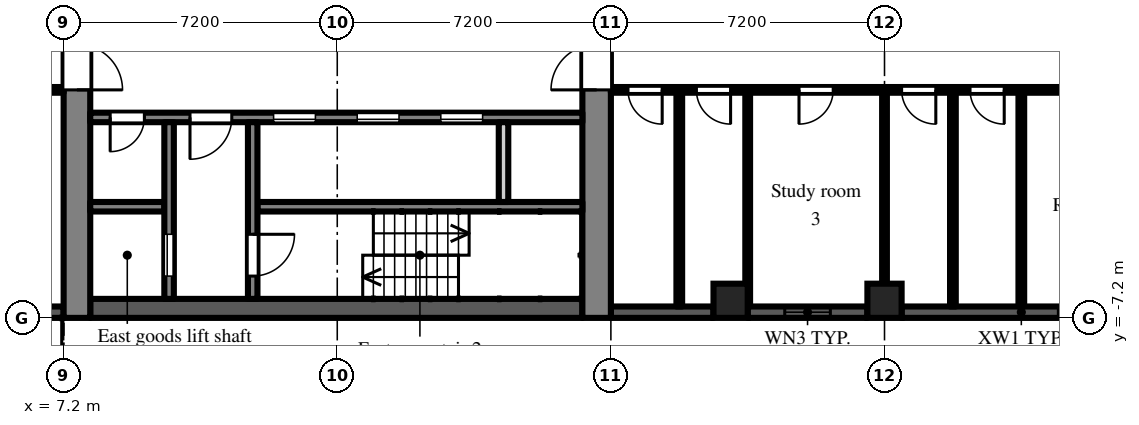
"""IFC4 building model, lengths in metres.
Left out: names, types, materials, properties, quantities, classifications, styles, units other than length and angle.
Written with IfcOpenShell. Run it as: python <this file> out.ifc"""

import sys

from ifc_helpers import new_model, si_unit, direction, frame, frame_2d, origin, origin_2d, place, context, subcontext, project, spatial, rectangle, extrude, element, fill, save


model = new_model("IFC4")
c1 = context("Model", 3, precision=1e-05, world=origin(), true_north=direction((0.0, 1.0)))
c2 = subcontext(c1, "Body", "Model", "MODEL_VIEW")
j1 = project(units=[si_unit("LENGTHUNIT", "METRE"), si_unit("PLANEANGLEUNIT", "RADIAN")], contexts=[c1])
p1 = place(None, origin())
s1 = spatial("IfcSite", under=j1, at=p1, CompositionType="ELEMENT")
p2 = place(p1, origin())
s2 = spatial("IfcBuilding", under=s1, at=p2, CompositionType="ELEMENT")
p3 = place(p2, frame((0.0, 0.0, 75.9)))
s3 = spatial("IfcBuildingStorey", under=s2, at=p3, CompositionType="ELEMENT", Elevation=75.9)
for number, where, z_axis, x_axis in (
    (1, (24.75, -6.75, 0.0), (0.0, 0.0, 1.0), (1.0, 0.0, 0.0)),
    (2, (28.8, -6.75, 0.0), (0.0, 0.0, 1.0), (1.0, 0.0, 0.0)),
):
    element("IfcColumn", number, at=place(p3, frame(where, z_axis=z_axis, x_axis=x_axis)), inside=s3, PredefinedType="COLUMN", context=c2, shape_type="SweptSolid", body=[
        extrude(rectangle(XDim=0.9, YDim=0.9, at=origin_2d()), origin(), (0.0, 0.0, 1.0), 3.0),
    ])
p4 = place(p3, frame((21.6, -7.05, 0.0), z_axis=(0.0, 0.0, 1.0), x_axis=(1.0, 0.0, 0.0)))
e3 = element("IfcWall", 3, at=p4, inside=s3, PredefinedType="SOLIDWALL", context=c2, shape_type="SweptSolid", body=[
    extrude(rectangle(XDim=2.7, YDim=0.3, at=frame_2d((1.35, 0.0))), origin(), (0.0, 0.0, 1.0), 2.1),
])
p5 = place(p3, frame((25.2, -7.05, 0.0), z_axis=(0.0, 0.0, 1.0), x_axis=(1.0, 0.0, 0.0)))
e4 = element("IfcWall", 4, at=p5, inside=s3, PredefinedType="SOLIDWALL", context=c2, shape_type="SweptSolid", body=[
    extrude(rectangle(XDim=3.15, YDim=0.3, at=frame_2d((1.575, 0.0))), origin(), (0.0, 0.0, 1.0), 2.1),
])
p6 = place(p5, frame((0.975, 0.0, 0.2)))
e5 = element("IfcOpeningElement", 5, at=p6, cuts=e4, PredefinedType="OPENING", context=c2, shape_type="SweptSolid", body=[
    extrude(rectangle(XDim=1.2, YDim=1.85, at=frame_2d((0.6, 0.925))), frame((0.0, 0.16, 0.0), z_axis=(0.0, -1.0, 0.0), x_axis=(1.0, 0.0, 0.0)), (0.0, 0.0, 1.0), 0.32),
])
p7 = place(p3, frame((29.25, -7.05, 0.0), z_axis=(0.0, 0.0, 1.0), x_axis=(1.0, 0.0, 0.0)))
e6 = element("IfcWall", 6, at=p7, inside=s3, PredefinedType="SOLIDWALL", context=c2, shape_type="SweptSolid", body=[
    extrude(rectangle(XDim=6.3, YDim=0.3, at=frame_2d((3.15, 0.0))), origin(), (0.0, 0.0, 1.0), 2.1),
])
p8 = place(p7, frame((4.125, 0.0, 0.2)))
e7 = element("IfcOpeningElement", 7, at=p8, cuts=e6, PredefinedType="OPENING", context=c2, shape_type="SweptSolid", body=[
    extrude(rectangle(XDim=1.2, YDim=1.85, at=frame_2d((0.6, 0.925))), frame((0.0, 0.16, 0.0), z_axis=(0.0, -1.0, 0.0), x_axis=(1.0, 0.0, 0.0)), (0.0, 0.0, 1.0), 0.32),
])
p9 = place(p3, frame((4.2, -7.05, 0.0), z_axis=(0.0, 0.0, 1.0), x_axis=(1.0, 0.0, 0.0)))
e8 = element("IfcWall", 8, at=p9, inside=s3, PredefinedType="SOLIDWALL", context=c2, shape_type="SweptSolid", body=[
    extrude(rectangle(XDim=3.0, YDim=0.3, at=frame_2d((1.5, 0.0))), origin(), (0.0, 0.0, 1.0), 2.1),
])
p10 = place(p3, frame((7.55, -7.2, 0.0), z_axis=(0.0, 0.0, 1.0), x_axis=(0.0, 1.0, 0.0)))
e9 = element("IfcWall", 9, at=p10, inside=s3, PredefinedType="SHEAR", context=c2, shape_type="SweptSolid", body=[
    extrude(rectangle(XDim=14.4, YDim=0.7, at=frame_2d((7.2, 0.0))), origin(), (0.0, 0.0, 1.0), 2.575),
])
p11 = place(p10, frame((6.0, 0.0, 0.0)))
e10 = element("IfcOpeningElement", 10, at=p11, cuts=e9, PredefinedType="OPENING", context=c2, shape_type="SweptSolid", body=[
    extrude(rectangle(XDim=2.4, YDim=2.2, at=frame_2d((1.2, 1.1))), frame((0.0, 0.36, 0.0), z_axis=(0.0, -1.0, 0.0), x_axis=(1.0, 0.0, 0.0)), (0.0, 0.0, 1.0), 0.72),
])
p12 = place(p3, frame((21.225, -7.2, 0.0), z_axis=(0.0, 0.0, 1.0), x_axis=(0.0, 1.0, 0.0)))
e11 = element("IfcWall", 11, at=p12, inside=s3, PredefinedType="SHEAR", context=c2, shape_type="SweptSolid", body=[
    extrude(rectangle(XDim=14.4, YDim=0.75, at=frame_2d((7.2, 0.0))), origin(), (0.0, 0.0, 1.0), 2.575),
])
p13 = place(p12, frame((6.0, 0.0, 0.0)))
e12 = element("IfcOpeningElement", 12, at=p13, cuts=e11, PredefinedType="OPENING", context=c2, shape_type="SweptSolid", body=[
    extrude(rectangle(XDim=2.4, YDim=2.2, at=frame_2d((1.2, 1.1))), frame((0.0, 0.385, 0.0), z_axis=(0.0, -1.0, 0.0), x_axis=(1.0, 0.0, 0.0)), (0.0, 0.0, 1.0), 0.77),
])
p14 = place(p3, frame((7.9, -6.95, 0.0), z_axis=(0.0, 0.0, 1.0), x_axis=(1.0, 0.0, 0.0)))
e13 = element("IfcWall", 13, at=p14, inside=s3, PredefinedType="SHEAR", context=c2, shape_type="SweptSolid", body=[
    extrude(rectangle(XDim=12.95, YDim=0.5, at=frame_2d((6.475, 0.0))), origin(), (0.0, 0.0, 1.0), 2.575),
])
p15 = place(p3, frame((7.9, -1.925, 0.0), z_axis=(0.0, 0.0, 1.0), x_axis=(1.0, 0.0, 0.0)))
e14 = element("IfcWall", 14, at=p15, inside=s3, PredefinedType="SHEAR", context=c2, shape_type="SweptSolid", body=[
    extrude(rectangle(XDim=12.95, YDim=0.25, at=frame_2d((6.475, 0.0))), origin(), (0.0, 0.0, 1.0), 2.575),
])
p16 = place(p15, frame((4.825, 0.0, 0.0)))
e15 = element("IfcOpeningElement", 15, at=p16, cuts=e14, PredefinedType="OPENING", context=c2, shape_type="SweptSolid", body=[
    extrude(rectangle(XDim=1.1, YDim=2.1, at=frame_2d((0.55, 1.05))), frame((0.0, 0.135, 0.0), z_axis=(0.0, -1.0, 0.0), x_axis=(1.0, 0.0, 0.0)), (0.0, 0.0, 1.0), 0.27),
])
p17 = place(p15, frame((7.025, 0.0, 0.0)))
e16 = element("IfcOpeningElement", 16, at=p17, cuts=e14, PredefinedType="OPENING", context=c2, shape_type="SweptSolid", body=[
    extrude(rectangle(XDim=1.1, YDim=2.1, at=frame_2d((0.55, 1.05))), frame((0.0, 0.135, 0.0), z_axis=(0.0, -1.0, 0.0), x_axis=(1.0, 0.0, 0.0)), (0.0, 0.0, 1.0), 0.27),
])
p18 = place(p15, frame((9.225, 0.0, 0.0)))
e17 = element("IfcOpeningElement", 17, at=p18, cuts=e14, PredefinedType="OPENING", context=c2, shape_type="SweptSolid", body=[
    extrude(rectangle(XDim=1.1, YDim=2.1, at=frame_2d((0.55, 1.05))), frame((0.0, 0.135, 0.0), z_axis=(0.0, -1.0, 0.0), x_axis=(1.0, 0.0, 0.0)), (0.0, 0.0, 1.0), 0.27),
])
p19 = place(p15, frame((0.525, 0.0, 0.0)))
e18 = element("IfcOpeningElement", 18, at=p19, cuts=e14, PredefinedType="OPENING", context=c2, shape_type="SweptSolid", body=[
    extrude(rectangle(XDim=0.9, YDim=2.1, at=frame_2d((0.45, 1.05))), frame((0.0, 0.135, 0.0), z_axis=(0.0, -1.0, 0.0), x_axis=(1.0, 0.0, 0.0)), (0.0, 0.0, 1.0), 0.27),
])
p20 = place(p15, frame((2.625, 0.0, 0.0)))
e19 = element("IfcOpeningElement", 19, at=p20, cuts=e14, PredefinedType="OPENING", context=c2, shape_type="SweptSolid", body=[
    extrude(rectangle(XDim=1.1, YDim=2.1, at=frame_2d((0.55, 1.05))), frame((0.0, 0.135, 0.0), z_axis=(0.0, -1.0, 0.0), x_axis=(1.0, 0.0, 0.0)), (0.0, 0.0, 1.0), 0.27),
])
p21 = place(p3, frame((7.9, -4.275, 0.0), z_axis=(0.0, 0.0, 1.0), x_axis=(1.0, 0.0, 0.0)))
e20 = element("IfcWall", 20, at=p21, inside=s3, PredefinedType="SHEAR", context=c2, shape_type="SweptSolid", body=[
    extrude(rectangle(XDim=1.95, YDim=0.25, at=frame_2d((0.975, 0.0))), origin(), (0.0, 0.0, 1.0), 2.575),
])
p22 = place(p3, frame((12.3, -4.275, 0.0), z_axis=(0.0, 0.0, 1.0), x_axis=(1.0, 0.0, 0.0)))
e21 = element("IfcWall", 21, at=p22, inside=s3, PredefinedType="SHEAR", context=c2, shape_type="SweptSolid", body=[
    extrude(rectangle(XDim=8.55, YDim=0.25, at=frame_2d((4.275, 0.0))), origin(), (0.0, 0.0, 1.0), 2.575),
])
p23 = place(p3, frame((9.975, -2.05, 0.0), z_axis=(0.0, 0.0, 1.0), x_axis=(0.0, -1.0, 0.0)))
e22 = element("IfcWall", 22, at=p23, inside=s3, PredefinedType="SHEAR", context=c2, shape_type="SweptSolid", body=[
    extrude(rectangle(XDim=4.65, YDim=0.25, at=frame_2d((2.325, 0.0))), origin(), (0.0, 0.0, 1.0), 2.575),
])
p24 = place(p23, frame((2.95, 0.0, 0.0)))
e23 = element("IfcOpeningElement", 23, at=p24, cuts=e22, PredefinedType="OPENING", context=c2, shape_type="SweptSolid", body=[
    extrude(rectangle(XDim=1.1, YDim=2.1, at=frame_2d((0.55, 1.05))), frame((0.0, 0.135, 0.0), z_axis=(0.0, -1.0, 0.0), x_axis=(1.0, 0.0, 0.0)), (0.0, 0.0, 1.0), 0.27),
])
p25 = place(p3, frame((12.175, -2.05, 0.0), z_axis=(0.0, 0.0, 1.0), x_axis=(0.0, -1.0, 0.0)))
e24 = element("IfcWall", 24, at=p25, inside=s3, PredefinedType="SHEAR", context=c2, shape_type="SweptSolid", body=[
    extrude(rectangle(XDim=4.65, YDim=0.25, at=frame_2d((2.325, 0.0))), origin(), (0.0, 0.0, 1.0), 2.575),
])
p26 = place(p25, frame((2.95, 0.0, 0.0)))
e25 = element("IfcOpeningElement", 25, at=p26, cuts=e24, PredefinedType="OPENING", context=c2, shape_type="SweptSolid", body=[
    extrude(rectangle(XDim=1.1, YDim=2.1, at=frame_2d((0.55, 1.05))), frame((0.0, 0.135, 0.0), z_axis=(0.0, -1.0, 0.0), x_axis=(1.0, 0.0, 0.0)), (0.0, 0.0, 1.0), 0.27),
])
p27 = place(p3, frame((18.775, -2.05, 0.0), z_axis=(0.0, 0.0, 1.0), x_axis=(0.0, -1.0, 0.0)))
e26 = element("IfcWall", 26, at=p27, inside=s3, PredefinedType="PARTITIONING", context=c2, shape_type="SweptSolid", body=[
    extrude(rectangle(XDim=2.1, YDim=0.25, at=frame_2d((1.05, 0.0))), origin(), (0.0, 0.0, 1.0), 2.575),
])
p28 = place(p3, frame((1.275, -1.2, 0.0), z_axis=(0.0, 0.0, 1.0), x_axis=(1.0, 0.0, 0.0)))
e27 = element("IfcWall", 27, at=p28, inside=s3, PredefinedType="PARTITIONING", context=c2, shape_type="SweptSolid", body=[
    extrude(rectangle(XDim=5.925, YDim=0.15, at=frame_2d((2.962, 0.0))), origin(), (0.0, 0.0, 1.0), 2.575),
])
p29 = place(p28, frame((3.075, 0.0, 0.0)))
e28 = element("IfcOpeningElement", 28, at=p29, cuts=e27, PredefinedType="OPENING", context=c2, shape_type="SweptSolid", body=[
    extrude(rectangle(XDim=0.9, YDim=2.1, at=frame_2d((0.45, 1.05))), frame((0.0, 0.085, 0.0), z_axis=(0.0, -1.0, 0.0), x_axis=(1.0, 0.0, 0.0)), (0.0, 0.0, 1.0), 0.17),
])
p30 = place(p3, frame((21.6, -1.2, 0.0), z_axis=(0.0, 0.0, 1.0), x_axis=(1.0, 0.0, 0.0)))
e29 = element("IfcWall", 29, at=p30, inside=s3, PredefinedType="PARTITIONING", context=c2, shape_type="SweptSolid", body=[
    extrude(rectangle(XDim=14.9, YDim=0.15, at=frame_2d((7.45, 0.0))), origin(), (0.0, 0.0, 1.0), 2.575),
])
p31 = place(p30, frame((0.45, 0.0, 0.0)))
e30 = element("IfcOpeningElement", 30, at=p31, cuts=e29, PredefinedType="OPENING", context=c2, shape_type="SweptSolid", body=[
    extrude(rectangle(XDim=0.9, YDim=2.1, at=frame_2d((0.45, 1.05))), frame((0.0, 0.085, 0.0), z_axis=(0.0, -1.0, 0.0), x_axis=(1.0, 0.0, 0.0)), (0.0, 0.0, 1.0), 0.17),
])
p32 = place(p30, frame((2.25, 0.0, 0.0)))
e31 = element("IfcOpeningElement", 31, at=p32, cuts=e29, PredefinedType="OPENING", context=c2, shape_type="SweptSolid", body=[
    extrude(rectangle(XDim=0.9, YDim=2.1, at=frame_2d((0.45, 1.05))), frame((0.0, 0.085, 0.0), z_axis=(0.0, -1.0, 0.0), x_axis=(1.0, 0.0, 0.0)), (0.0, 0.0, 1.0), 0.17),
])
p33 = place(p30, frame((4.95, 0.0, 0.0)))
e32 = element("IfcOpeningElement", 32, at=p33, cuts=e29, PredefinedType="OPENING", context=c2, shape_type="SweptSolid", body=[
    extrude(rectangle(XDim=0.9, YDim=2.1, at=frame_2d((0.45, 1.05))), frame((0.0, 0.085, 0.0), z_axis=(0.0, -1.0, 0.0), x_axis=(1.0, 0.0, 0.0)), (0.0, 0.0, 1.0), 0.17),
])
p34 = place(p30, frame((7.65, 0.0, 0.0)))
e33 = element("IfcOpeningElement", 33, at=p34, cuts=e29, PredefinedType="OPENING", context=c2, shape_type="SweptSolid", body=[
    extrude(rectangle(XDim=0.9, YDim=2.1, at=frame_2d((0.45, 1.05))), frame((0.0, 0.085, 0.0), z_axis=(0.0, -1.0, 0.0), x_axis=(1.0, 0.0, 0.0)), (0.0, 0.0, 1.0), 0.17),
])
p35 = place(p30, frame((9.45, 0.0, 0.0)))
e34 = element("IfcOpeningElement", 34, at=p35, cuts=e29, PredefinedType="OPENING", context=c2, shape_type="SweptSolid", body=[
    extrude(rectangle(XDim=0.9, YDim=2.1, at=frame_2d((0.45, 1.05))), frame((0.0, 0.085, 0.0), z_axis=(0.0, -1.0, 0.0), x_axis=(1.0, 0.0, 0.0)), (0.0, 0.0, 1.0), 0.17),
])
p36 = place(p30, frame((11.95, 0.0, 0.0)))
e35 = element("IfcOpeningElement", 35, at=p36, cuts=e29, PredefinedType="OPENING", context=c2, shape_type="SweptSolid", body=[
    extrude(rectangle(XDim=1.8, YDim=2.1, at=frame_2d((0.9, 1.05))), frame((0.0, 0.085, 0.0), z_axis=(0.0, -1.0, 0.0), x_axis=(1.0, 0.0, 0.0)), (0.0, 0.0, 1.0), 0.17),
])
p37 = place(p3, frame((23.4, -6.9, 0.0), z_axis=(0.0, 0.0, 1.0), x_axis=(0.0, 1.0, 0.0)))
e36 = element("IfcWall", 36, at=p37, inside=s3, PredefinedType="PARTITIONING", context=c2, shape_type="SweptSolid", body=[
    extrude(rectangle(XDim=5.625, YDim=0.15, at=frame_2d((2.812, 0.0))), origin(), (0.0, 0.0, 1.0), 2.575),
])
for number, where, z_axis, x_axis in (
    (37, (25.2, -6.9, 0.0), (0.0, 0.0, 1.0), (0.0, 1.0, 0.0)),
    (38, (28.8, -6.9, 0.0), (0.0, 0.0, 1.0), (0.0, 1.0, 0.0)),
):
    element("IfcWall", number, at=place(p3, frame(where, z_axis=z_axis, x_axis=x_axis)), inside=s3, PredefinedType="PARTITIONING", context=c2, shape_type="SweptSolid", body=[
        extrude(rectangle(XDim=5.625, YDim=0.125, at=frame_2d((2.812, 0.0))), origin(), (0.0, 0.0, 1.0), 2.575),
    ])
for number, where, z_axis, x_axis in (
    (39, (30.6, -6.9, 0.0), (0.0, 0.0, 1.0), (0.0, 1.0, 0.0)),
    (40, (32.4, -6.9, 0.0), (0.0, 0.0, 1.0), (0.0, 1.0, 0.0)),
):
    element("IfcWall", number, at=place(p3, frame(where, z_axis=z_axis, x_axis=x_axis)), inside=s3, PredefinedType="PARTITIONING", context=c2, shape_type="SweptSolid", body=[
        extrude(rectangle(XDim=5.625, YDim=0.15, at=frame_2d((2.812, 0.0))), origin(), (0.0, 0.0, 1.0), 2.575),
    ])
p38 = place(p6, origin())
e41 = element("IfcWindow", 41, at=p38, inside=s3, PartitioningType="SINGLE_PANEL", PredefinedType="WINDOW", context=c2, shape_type="SweptSolid", body=[
    extrude(rectangle(XDim=1.2, YDim=1.85, at=frame_2d((0.6, 0.925))), frame((0.0, 0.03, 0.0), z_axis=(0.0, -1.0, 0.0), x_axis=(1.0, 0.0, 0.0)), (0.0, 0.0, 1.0), 0.06),
])
fill(e5, e41)
p39 = place(p8, origin())
e42 = element("IfcWindow", 42, at=p39, inside=s3, PartitioningType="SINGLE_PANEL", PredefinedType="WINDOW", context=c2, shape_type="SweptSolid", body=[
    extrude(rectangle(XDim=1.2, YDim=1.85, at=frame_2d((0.6, 0.925))), frame((0.0, 0.03, 0.0), z_axis=(0.0, -1.0, 0.0), x_axis=(1.0, 0.0, 0.0)), (0.0, 0.0, 1.0), 0.06),
])
fill(e7, e42)
p40 = place(p16, origin())
e43 = element("IfcDoor", 43, at=p40, inside=s3, OperationType="SLIDING_TO_LEFT", PredefinedType="DOOR", context=c2, shape_type="SweptSolid", body=[
    extrude(rectangle(XDim=1.1, YDim=2.1, at=frame_2d((0.55, 1.05))), frame((0.0, 0.025, 0.0), z_axis=(0.0, -1.0, 0.0), x_axis=(1.0, 0.0, 0.0)), (0.0, 0.0, 1.0), 0.05),
])
fill(e15, e43)
p41 = place(p17, origin())
e44 = element("IfcDoor", 44, at=p41, inside=s3, OperationType="SLIDING_TO_LEFT", PredefinedType="DOOR", context=c2, shape_type="SweptSolid", body=[
    extrude(rectangle(XDim=1.1, YDim=2.1, at=frame_2d((0.55, 1.05))), frame((0.0, 0.025, 0.0), z_axis=(0.0, -1.0, 0.0), x_axis=(1.0, 0.0, 0.0)), (0.0, 0.0, 1.0), 0.05),
])
fill(e16, e44)
p42 = place(p18, origin())
e45 = element("IfcDoor", 45, at=p42, inside=s3, OperationType="SLIDING_TO_LEFT", PredefinedType="DOOR", context=c2, shape_type="SweptSolid", body=[
    extrude(rectangle(XDim=1.1, YDim=2.1, at=frame_2d((0.55, 1.05))), frame((0.0, 0.025, 0.0), z_axis=(0.0, -1.0, 0.0), x_axis=(1.0, 0.0, 0.0)), (0.0, 0.0, 1.0), 0.05),
])
fill(e17, e45)
p43 = place(p24, origin())
e46 = element("IfcDoor", 46, at=p43, inside=s3, OperationType="SLIDING_TO_LEFT", PredefinedType="DOOR", context=c2, shape_type="SweptSolid", body=[
    extrude(rectangle(XDim=1.1, YDim=2.1, at=frame_2d((0.55, 1.05))), frame((0.0, 0.025, 0.0), z_axis=(0.0, -1.0, 0.0), x_axis=(1.0, 0.0, 0.0)), (0.0, 0.0, 1.0), 0.05),
])
fill(e23, e46)
p44 = place(p26, origin())
e47 = element("IfcDoor", 47, at=p44, inside=s3, OperationType="SINGLE_SWING_LEFT", PredefinedType="DOOR", context=c2, shape_type="SweptSolid", body=[
    extrude(rectangle(XDim=1.1, YDim=2.1, at=frame_2d((0.55, 1.05))), frame((0.0, 0.025, 0.0), z_axis=(0.0, -1.0, 0.0), x_axis=(1.0, 0.0, 0.0)), (0.0, 0.0, 1.0), 0.05),
])
fill(e25, e47)
p45 = place(p19, frame((0.9, 0.0, 0.0), z_axis=(0.0, 0.0, 1.0), x_axis=(-1.0, 0.0, 0.0)))
e48 = element("IfcDoor", 48, at=p45, inside=s3, OperationType="SINGLE_SWING_RIGHT", PredefinedType="DOOR", context=c2, shape_type="SweptSolid", body=[
    extrude(rectangle(XDim=0.9, YDim=2.1, at=frame_2d((0.45, 1.05))), frame((0.0, 0.025, 0.0), z_axis=(0.0, -1.0, 0.0), x_axis=(1.0, 0.0, 0.0)), (0.0, 0.0, 1.0), 0.05),
])
fill(e18, e48)
p46 = place(p20, frame((1.1, 0.0, 0.0), z_axis=(0.0, 0.0, 1.0), x_axis=(-1.0, 0.0, 0.0)))
e49 = element("IfcDoor", 49, at=p46, inside=s3, OperationType="SINGLE_SWING_RIGHT", PredefinedType="DOOR", context=c2, shape_type="SweptSolid", body=[
    extrude(rectangle(XDim=1.1, YDim=2.1, at=frame_2d((0.55, 1.05))), frame((0.0, 0.025, 0.0), z_axis=(0.0, -1.0, 0.0), x_axis=(1.0, 0.0, 0.0)), (0.0, 0.0, 1.0), 0.05),
])
fill(e19, e49)
p47 = place(p11, frame((2.4, 0.0, 0.0), z_axis=(0.0, 0.0, 1.0), x_axis=(-1.0, 0.0, 0.0)))
e50 = element("IfcDoor", 50, at=p47, inside=s3, OperationType="DOUBLE_DOOR_DOUBLE_SWING", PredefinedType="DOOR", context=c2, shape_type="SweptSolid", body=[
    extrude(rectangle(XDim=2.4, YDim=2.2, at=frame_2d((1.2, 1.1))), frame((0.0, 0.025, 0.0), z_axis=(0.0, -1.0, 0.0), x_axis=(1.0, 0.0, 0.0)), (0.0, 0.0, 1.0), 0.05),
])
fill(e10, e50)
p48 = place(p13, origin())
e51 = element("IfcDoor", 51, at=p48, inside=s3, OperationType="DOUBLE_DOOR_DOUBLE_SWING", PredefinedType="DOOR", context=c2, shape_type="SweptSolid", body=[
    extrude(rectangle(XDim=2.4, YDim=2.2, at=frame_2d((1.2, 1.1))), frame((0.0, 0.025, 0.0), z_axis=(0.0, -1.0, 0.0), x_axis=(1.0, 0.0, 0.0)), (0.0, 0.0, 1.0), 0.05),
])
fill(e12, e51)
p49 = place(p31, frame((0.9, 0.0, 0.0), z_axis=(0.0, 0.0, 1.0), x_axis=(-1.0, 0.0, 0.0)))
e52 = element("IfcDoor", 52, at=p49, inside=s3, OperationType="SINGLE_SWING_LEFT", PredefinedType="DOOR", context=c2, shape_type="SweptSolid", body=[
    extrude(rectangle(XDim=0.9, YDim=2.1, at=frame_2d((0.45, 1.05))), frame((0.0, 0.025, 0.0), z_axis=(0.0, -1.0, 0.0), x_axis=(1.0, 0.0, 0.0)), (0.0, 0.0, 1.0), 0.05),
])
fill(e30, e52)
p50 = place(p32, frame((0.9, 0.0, 0.0), z_axis=(0.0, 0.0, 1.0), x_axis=(-1.0, 0.0, 0.0)))
e53 = element("IfcDoor", 53, at=p50, inside=s3, OperationType="SINGLE_SWING_LEFT", PredefinedType="DOOR", context=c2, shape_type="SweptSolid", body=[
    extrude(rectangle(XDim=0.9, YDim=2.1, at=frame_2d((0.45, 1.05))), frame((0.0, 0.025, 0.0), z_axis=(0.0, -1.0, 0.0), x_axis=(1.0, 0.0, 0.0)), (0.0, 0.0, 1.0), 0.05),
])
fill(e31, e53)
p51 = place(p33, frame((0.9, 0.0, 0.0), z_axis=(0.0, 0.0, 1.0), x_axis=(-1.0, 0.0, 0.0)))
e54 = element("IfcDoor", 54, at=p51, inside=s3, OperationType="SINGLE_SWING_RIGHT", PredefinedType="DOOR", context=c2, shape_type="SweptSolid", body=[
    extrude(rectangle(XDim=0.9, YDim=2.1, at=frame_2d((0.45, 1.05))), frame((0.0, 0.025, 0.0), z_axis=(0.0, -1.0, 0.0), x_axis=(1.0, 0.0, 0.0)), (0.0, 0.0, 1.0), 0.05),
])
fill(e32, e54)
p52 = place(p34, frame((0.9, 0.0, 0.0), z_axis=(0.0, 0.0, 1.0), x_axis=(-1.0, 0.0, 0.0)))
e55 = element("IfcDoor", 55, at=p52, inside=s3, OperationType="SINGLE_SWING_LEFT", PredefinedType="DOOR", context=c2, shape_type="SweptSolid", body=[
    extrude(rectangle(XDim=0.9, YDim=2.1, at=frame_2d((0.45, 1.05))), frame((0.0, 0.025, 0.0), z_axis=(0.0, -1.0, 0.0), x_axis=(1.0, 0.0, 0.0)), (0.0, 0.0, 1.0), 0.05),
])
fill(e33, e55)
p53 = place(p35, frame((0.9, 0.0, 0.0), z_axis=(0.0, 0.0, 1.0), x_axis=(-1.0, 0.0, 0.0)))
e56 = element("IfcDoor", 56, at=p53, inside=s3, OperationType="SINGLE_SWING_LEFT", PredefinedType="DOOR", context=c2, shape_type="SweptSolid", body=[
    extrude(rectangle(XDim=0.9, YDim=2.1, at=frame_2d((0.45, 1.05))), frame((0.0, 0.025, 0.0), z_axis=(0.0, -1.0, 0.0), x_axis=(1.0, 0.0, 0.0)), (0.0, 0.0, 1.0), 0.05),
])
fill(e34, e56)
save(model, sys.argv[1])
